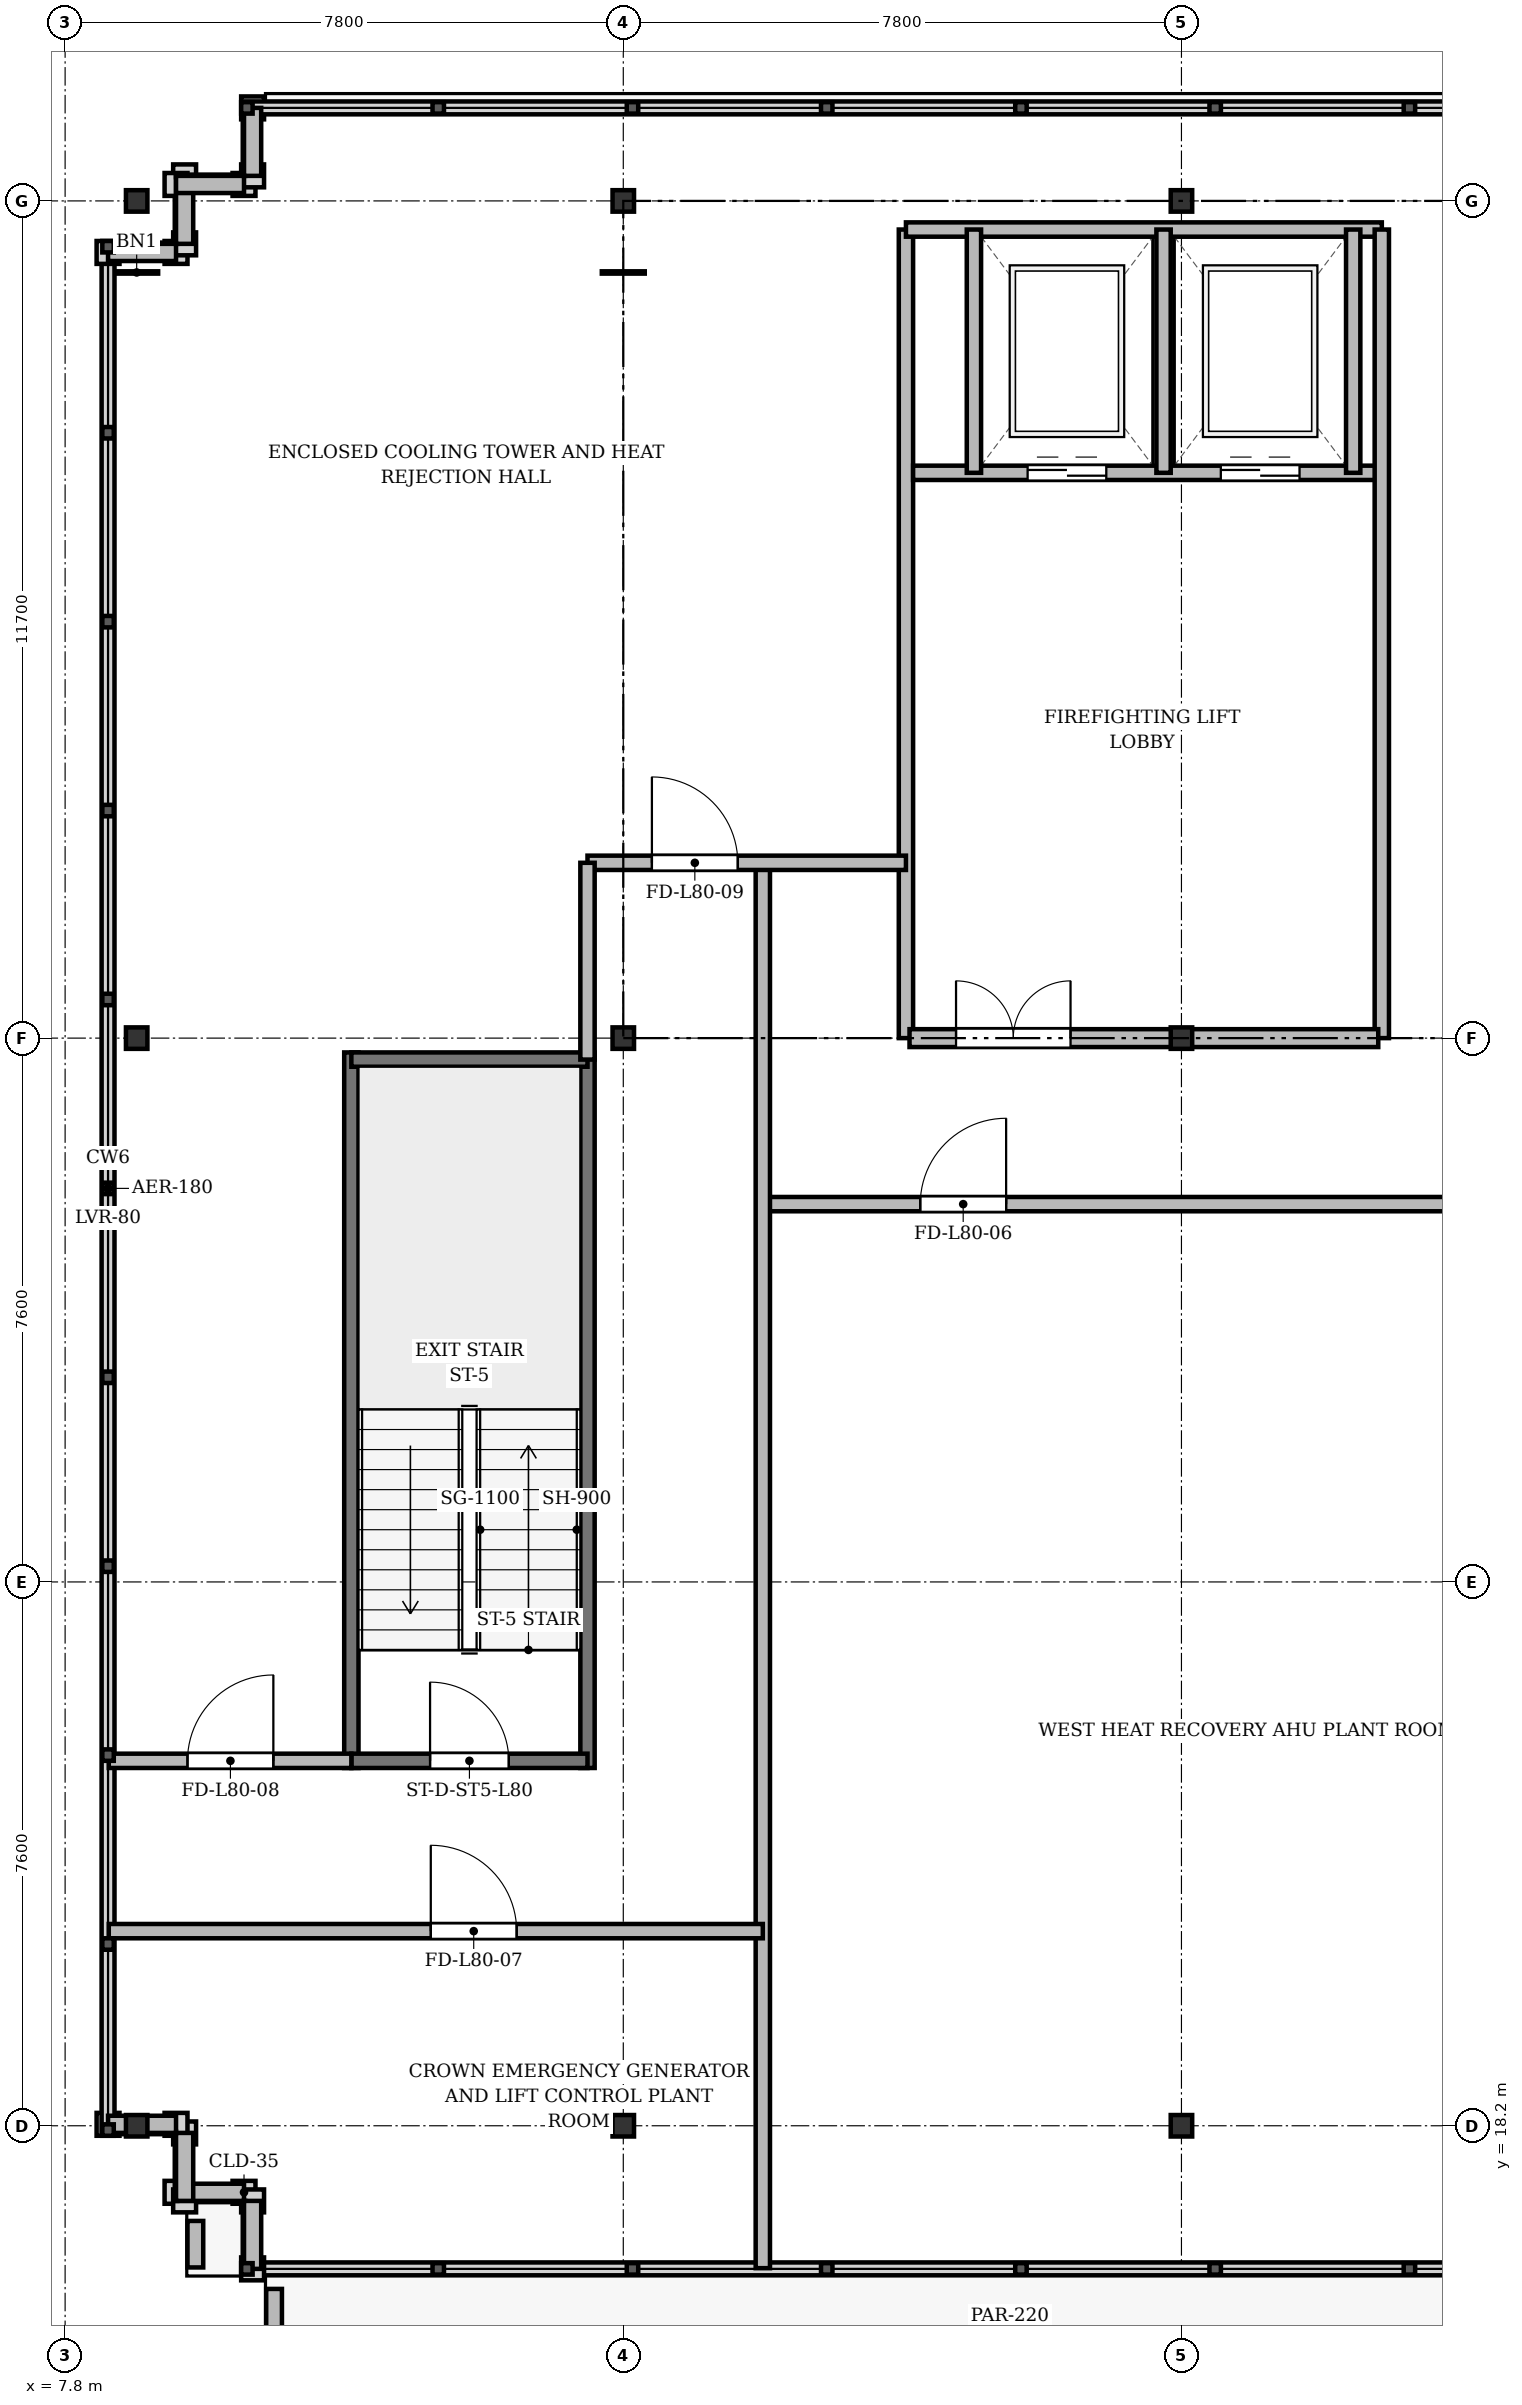
"""IFC4 building model, lengths in metres.
Left out: names, types, materials, properties, quantities, classifications, styles, units other than length and angle.
Written with IfcOpenShell. Run it as: python <this file> out.ifc"""

import sys

from ifc_helpers import new_model, si_unit, direction, frame, frame_2d, origin, origin_2d, place, context, subcontext, project, spatial, rectangle, i_section, extrude, source, transform, mapped, element, fill, save


model = new_model("IFC4")
c1 = context("Model", 3, precision=1e-05, world=origin(), true_north=direction((0.0, 1.0)))
c2 = subcontext(c1, "Body", "Model", "MODEL_VIEW")
j1 = project(units=[si_unit("LENGTHUNIT", "METRE"), si_unit("PLANEANGLEUNIT", "RADIAN")], contexts=[c1])
p1 = place(None, origin())
s1 = spatial("IfcSite", under=j1, at=p1, CompositionType="ELEMENT")
p2 = place(p1, origin())
s2 = spatial("IfcBuilding", under=s1, at=p2, CompositionType="ELEMENT")
p3 = place(p2, frame((0.0, 0.0, 307.9)))
s3 = spatial("IfcBuildingStorey", under=s2, at=p3, CompositionType="ELEMENT", Elevation=307.9)
m1 = source(origin(), c2, "Body", "SweptSolid", [
    extrude(i_section(OverallWidth=0.3, OverallDepth=0.3, WebThickness=0.015, FlangeThickness=0.024, at=origin_2d()), origin(), (0.0, 0.0, 1.0), 4.4),
])
for number, where, z_axis, x_axis in (
    (1, (8.8, 18.2, 0.0), (0.0, 0.0, 1.0), (1.0, 0.0, 0.0)),
    (2, (8.8, 33.4, 0.0), (0.0, 0.0, 1.0), (1.0, 0.0, 0.0)),
    (3, (8.8, 45.1, 0.0), (0.0, 0.0, 1.0), (1.0, 0.0, 0.0)),
    (4, (15.6, 18.2, 0.0), (0.0, 0.0, 1.0), (1.0, 0.0, 0.0)),
    (5, (15.6, 33.4, 0.0), (0.0, 0.0, 1.0), (1.0, 0.0, 0.0)),
    (6, (15.6, 45.1, 0.0), (0.0, 0.0, 1.0), (1.0, 0.0, 0.0)),
    (7, (23.4, 18.2, 0.0), (0.0, 0.0, 1.0), (1.0, 0.0, 0.0)),
    (8, (23.4, 33.4, 0.0), (0.0, 0.0, 1.0), (1.0, 0.0, 0.0)),
    (9, (23.4, 45.1, 0.0), (0.0, 0.0, 1.0), (1.0, 0.0, 0.0)),
):
    element("IfcColumn", number, at=place(p3, frame(where, z_axis=z_axis, x_axis=x_axis)), inside=s3, PredefinedType="COLUMN", context=c2, shape_type="MappedRepresentation", body=[
        mapped(m1, transform((0.0, 0.0, 0.0), x_axis=(1.0, 0.0, 0.0), y_axis=(0.0, 1.0, 0.0), z_axis=(0.0, 0.0, 1.0), scale=1.0)),
    ])
p4 = place(p3, frame((10.3, 17.27, 0.0), z_axis=(0.0, 0.0, 1.0), x_axis=(-1.0, 0.0, 0.0)))
e10 = element("IfcWall", 10, at=p4, inside=s3, PredefinedType="SOLIDWALL", context=c2, shape_type="SweptSolid", body=[
    extrude(rectangle(XDim=0.95, YDim=0.24, at=frame_2d((0.475, 0.0))), origin(), (0.0, 0.0, 1.0), 4.1),
])
p5 = place(p3, frame((9.47, 17.15, 0.0), z_axis=(0.0, 0.0, 1.0), x_axis=(0.0, 1.0, 0.0)))
e11 = element("IfcWall", 11, at=p5, inside=s3, PredefinedType="SOLIDWALL", context=c2, shape_type="SweptSolid", body=[
    extrude(rectangle(XDim=0.95, YDim=0.24, at=frame_2d((0.475, 0.0))), origin(), (0.0, 0.0, 1.0), 4.1),
])
for number, where, z_axis, x_axis in (
    (12, (9.35, 18.22, 0.0), (0.0, 0.0, 1.0), (-1.0, 0.0, 0.0)),
    (13, (8.4, 44.38, 0.0), (0.0, 0.0, 1.0), (1.0, 0.0, 0.0)),
):
    element("IfcWall", number, at=place(p3, frame(where, z_axis=z_axis, x_axis=x_axis)), inside=s3, PredefinedType="SOLIDWALL", context=c2, shape_type="SweptSolid", body=[
        extrude(rectangle(XDim=0.95, YDim=0.24, at=frame_2d((0.475, 0.0))), origin(), (0.0, 0.0, 1.0), 3.6),
    ])
p6 = place(p3, frame((9.47, 44.5, 0.0), z_axis=(0.0, 0.0, 1.0), x_axis=(0.0, 1.0, 0.0)))
e14 = element("IfcWall", 14, at=p6, inside=s3, PredefinedType="SOLIDWALL", context=c2, shape_type="SweptSolid", body=[
    extrude(rectangle(XDim=0.95, YDim=0.24, at=frame_2d((0.475, 0.0))), origin(), (0.0, 0.0, 1.0), 3.6),
])
for number, where, z_axis, x_axis in (
    (15, (9.35, 45.33, 0.0), (0.0, 0.0, 1.0), (1.0, 0.0, 0.0)),
    (16, (10.42, 45.45, 0.0), (0.0, 0.0, 1.0), (0.0, 1.0, 0.0)),
    (17, (10.42, 16.2, 0.0), (0.0, 0.0, 1.0), (0.0, 1.0, 0.0)),
):
    element("IfcWall", number, at=place(p3, frame(where, z_axis=z_axis, x_axis=x_axis)), inside=s3, PredefinedType="SOLIDWALL", context=c2, shape_type="SweptSolid", body=[
        extrude(rectangle(XDim=0.95, YDim=0.24, at=frame_2d((0.475, 0.0))), origin(), (0.0, 0.0, 1.0), 4.1),
    ])
p7 = place(p3, frame((9.62, 16.22, 0.0), z_axis=(0.0, 0.0, 1.0), x_axis=(0.0, 1.0, 0.0)))
e18 = element("IfcWall", 18, at=p7, inside=s3, PredefinedType="PARAPET", context=c2, shape_type="SweptSolid", body=[
    extrude(rectangle(XDim=0.65, YDim=0.22, at=frame_2d((0.325, 0.0))), origin(), (0.0, 0.0, 1.0), 1.08),
])
p8 = place(p3, frame((10.72, 15.12, 0.0), z_axis=(0.0, 0.0, 1.0), x_axis=(0.0, 1.0, 0.0)))
e19 = element("IfcWall", 19, at=p8, inside=s3, PredefinedType="PARAPET", context=c2, shape_type="SweptSolid", body=[
    extrude(rectangle(XDim=0.8, YDim=0.22, at=frame_2d((0.4, 0.0))), origin(), (0.0, 0.0, 1.0), 1.08),
])
for number, where, z_axis, x_axis in (
    (20, (11.8, 23.2, 0.0), (0.0, 0.0, 1.0), (0.0, 1.0, 0.0)),
    (21, (15.1, 23.2, 0.0), (0.0, 0.0, 1.0), (0.0, 1.0, 0.0)),
):
    element("IfcWall", number, at=place(p3, frame(where, z_axis=z_axis, x_axis=x_axis)), inside=s3, PredefinedType="SHEAR", context=c2, shape_type="SweptSolid", body=[
        extrude(rectangle(XDim=10.0, YDim=0.2, at=frame_2d((5.0, 0.0))), origin(), (0.0, 0.0, 1.0), 4.1),
    ])
p9 = place(p3, frame((11.8, 33.1, 0.0), z_axis=(0.0, 0.0, 1.0), x_axis=(1.0, 0.0, 0.0)))
e22 = element("IfcWall", 22, at=p9, inside=s3, PredefinedType="SHEAR", context=c2, shape_type="SweptSolid", body=[
    extrude(rectangle(XDim=3.3, YDim=0.2, at=frame_2d((1.65, 0.0))), origin(), (0.0, 0.0, 1.0), 4.1),
])
p10 = place(p3, frame((11.8, 23.3, 0.0), z_axis=(0.0, 0.0, 1.0), x_axis=(1.0, 0.0, 0.0)))
e23 = element("IfcWall", 23, at=p10, inside=s3, PredefinedType="SHEAR", context=c2, shape_type="SweptSolid", body=[
    extrude(rectangle(XDim=3.3, YDim=0.2, at=frame_2d((1.65, 0.0))), origin(), (0.0, 0.0, 1.0), 4.1),
])
p11 = place(p10, frame((1.1, 0.0, 0.0)))
e24 = element("IfcOpeningElement", 24, at=p11, cuts=e23, PredefinedType="OPENING", context=c2, shape_type="SweptSolid", body=[
    extrude(rectangle(XDim=1.1, YDim=2.15, at=frame_2d((0.55, 1.075))), frame((0.0, 0.11, 0.0), z_axis=(0.0, -1.0, 0.0), x_axis=(1.0, 0.0, 0.0)), (0.0, 0.0, 1.0), 0.22),
])
p12 = place(p3, frame((19.55, 33.4, 0.0), z_axis=(0.0, 0.0, 1.0), x_axis=(0.0, 1.0, 0.0)))
e25 = element("IfcWall", 25, at=p12, inside=s3, PredefinedType="PARTITIONING", context=c2, shape_type="SweptSolid", body=[
    extrude(rectangle(XDim=11.3, YDim=0.2, at=frame_2d((5.65, 0.0))), origin(), (0.0, 0.0, 1.0), 3.6),
])
p13 = place(p3, frame((19.55, 44.7, 0.0), z_axis=(0.0, 0.0, 1.0), x_axis=(1.0, 0.0, 0.0)))
e26 = element("IfcWall", 26, at=p13, inside=s3, PredefinedType="PARTITIONING", context=c2, shape_type="SweptSolid", body=[
    extrude(rectangle(XDim=6.65, YDim=0.2, at=frame_2d((3.325, 0.0))), origin(), (0.0, 0.0, 1.0), 4.1),
])
p14 = place(p3, frame((19.65, 41.3, 0.0), z_axis=(0.0, 0.0, 1.0), x_axis=(1.0, 0.0, 0.0)))
e27 = element("IfcWall", 27, at=p14, inside=s3, PredefinedType="SOLIDWALL", context=c2, shape_type="SweptSolid", body=[
    extrude(rectangle(XDim=6.5, YDim=0.2, at=frame_2d((3.25, 0.0))), origin(), (0.0, 0.0, 1.0), 4.1),
])
p15 = place(p14, frame((1.6, 0.0, 0.0)))
e28 = element("IfcOpeningElement", 28, at=p15, cuts=e27, PredefinedType="OPENING", context=c2, shape_type="SweptSolid", body=[
    extrude(rectangle(XDim=1.1, YDim=2.15, at=frame_2d((0.55, 1.075))), frame((0.0, 0.11, 0.0), z_axis=(0.0, -1.0, 0.0), x_axis=(1.0, 0.0, 0.0)), (0.0, 0.0, 1.0), 0.22),
])
p16 = place(p14, frame((4.3, 0.0, 0.0)))
e29 = element("IfcOpeningElement", 29, at=p16, cuts=e27, PredefinedType="OPENING", context=c2, shape_type="SweptSolid", body=[
    extrude(rectangle(XDim=1.1, YDim=2.15, at=frame_2d((0.55, 1.075))), frame((0.0, 0.11, 0.0), z_axis=(0.0, -1.0, 0.0), x_axis=(1.0, 0.0, 0.0)), (0.0, 0.0, 1.0), 0.22),
])
for number, where, z_axis, x_axis in (
    (30, (20.5, 41.3, 0.0), (0.0, 0.0, 1.0), (0.0, 1.0, 0.0)),
    (31, (23.15, 41.3, 0.0), (0.0, 0.0, 1.0), (0.0, 1.0, 0.0)),
    (32, (25.8, 41.3, 0.0), (0.0, 0.0, 1.0), (0.0, 1.0, 0.0)),
):
    element("IfcWall", number, at=place(p3, frame(where, z_axis=z_axis, x_axis=x_axis)), inside=s3, PredefinedType="SOLIDWALL", context=c2, shape_type="SweptSolid", body=[
        extrude(rectangle(XDim=3.4, YDim=0.2, at=frame_2d((1.7, 0.0))), origin(), (0.0, 0.0, 1.0), 4.1),
    ])
p17 = place(p3, frame((26.2, 33.4, 0.0), z_axis=(0.0, 0.0, 1.0), x_axis=(0.0, 1.0, 0.0)))
e33 = element("IfcWall", 33, at=p17, inside=s3, PredefinedType="SOLIDWALL", context=c2, shape_type="SweptSolid", body=[
    extrude(rectangle(XDim=11.3, YDim=0.2, at=frame_2d((5.65, 0.0))), origin(), (0.0, 0.0, 1.0), 3.6),
])
p18 = place(p3, frame((19.6, 33.4, 0.0), z_axis=(0.0, 0.0, 1.0), x_axis=(1.0, 0.0, 0.0)))
e34 = element("IfcWall", 34, at=p18, inside=s3, PredefinedType="PARTITIONING", context=c2, shape_type="SweptSolid", body=[
    extrude(rectangle(XDim=6.55, YDim=0.25, at=frame_2d((3.275, 0.0))), origin(), (0.0, 0.0, 1.0), 3.6),
])
p19 = place(p18, frame((0.65, 0.0, 0.0)))
e35 = element("IfcOpeningElement", 35, at=p19, cuts=e34, PredefinedType="OPENING", context=c2, shape_type="SweptSolid", body=[
    extrude(rectangle(XDim=1.6, YDim=2.2, at=frame_2d((0.8, 1.1))), frame((0.0, 0.135, 0.0), z_axis=(0.0, -1.0, 0.0), x_axis=(1.0, 0.0, 0.0)), (0.0, 0.0, 1.0), 0.27),
])
p20 = place(p3, frame((17.55, 31.08, 0.0), z_axis=(0.0, 0.0, 1.0), x_axis=(1.0, 0.0, 0.0)))
e36 = element("IfcWall", 36, at=p20, inside=s3, PredefinedType="PARTITIONING", context=c2, shape_type="SweptSolid", body=[
    extrude(rectangle(XDim=13.64, YDim=0.2, at=frame_2d((6.82, 0.0))), origin(), (0.0, 0.0, 1.0), 3.6),
])
p21 = place(p20, frame((2.2, 0.0, 0.0)))
e37 = element("IfcOpeningElement", 37, at=p21, cuts=e36, PredefinedType="OPENING", context=c2, shape_type="SweptSolid", body=[
    extrude(rectangle(XDim=1.2, YDim=2.15, at=frame_2d((0.6, 1.075))), frame((0.0, 0.11, 0.0), z_axis=(0.0, -1.0, 0.0), x_axis=(1.0, 0.0, 0.0)), (0.0, 0.0, 1.0), 0.22),
])
p22 = place(p3, frame((17.55, 16.21, 0.0), z_axis=(0.0, 0.0, 1.0), x_axis=(0.0, 1.0, 0.0)))
e38 = element("IfcWall", 38, at=p22, inside=s3, PredefinedType="PARTITIONING", context=c2, shape_type="SweptSolid", body=[
    extrude(rectangle(XDim=19.64, YDim=0.2, at=frame_2d((9.82, 0.0))), origin(), (0.0, 0.0, 1.0), 3.6),
])
p23 = place(p3, frame((8.41, 20.92, 0.0), z_axis=(0.0, 0.0, 1.0), x_axis=(1.0, 0.0, 0.0)))
e39 = element("IfcWall", 39, at=p23, inside=s3, PredefinedType="PARTITIONING", context=c2, shape_type="SweptSolid", body=[
    extrude(rectangle(XDim=9.14, YDim=0.2, at=frame_2d((4.57, 0.0))), origin(), (0.0, 0.0, 1.0), 3.6),
])
p24 = place(p23, frame((4.5, 0.0, 0.0)))
e40 = element("IfcOpeningElement", 40, at=p24, cuts=e39, PredefinedType="OPENING", context=c2, shape_type="SweptSolid", body=[
    extrude(rectangle(XDim=1.2, YDim=2.15, at=frame_2d((0.6, 1.075))), frame((0.0, 0.11, 0.0), z_axis=(0.0, -1.0, 0.0), x_axis=(1.0, 0.0, 0.0)), (0.0, 0.0, 1.0), 0.22),
])
p25 = place(p3, frame((8.41, 23.3, 0.0), z_axis=(0.0, 0.0, 1.0), x_axis=(1.0, 0.0, 0.0)))
e41 = element("IfcWall", 41, at=p25, inside=s3, PredefinedType="PARTITIONING", context=c2, shape_type="SweptSolid", body=[
    extrude(rectangle(XDim=3.39, YDim=0.2, at=frame_2d((1.695, 0.0))), origin(), (0.0, 0.0, 1.0), 3.6),
])
p26 = place(p25, frame((1.1, 0.0, 0.0)))
e42 = element("IfcOpeningElement", 42, at=p26, cuts=e41, PredefinedType="OPENING", context=c2, shape_type="SweptSolid", body=[
    extrude(rectangle(XDim=1.2, YDim=2.15, at=frame_2d((0.6, 1.075))), frame((0.0, 0.11, 0.0), z_axis=(0.0, -1.0, 0.0), x_axis=(1.0, 0.0, 0.0)), (0.0, 0.0, 1.0), 0.22),
])
p27 = place(p3, frame((15.1, 35.85, 0.0), z_axis=(0.0, 0.0, 1.0), x_axis=(1.0, 0.0, 0.0)))
e43 = element("IfcWall", 43, at=p27, inside=s3, PredefinedType="PARTITIONING", context=c2, shape_type="SweptSolid", body=[
    extrude(rectangle(XDim=4.45, YDim=0.2, at=frame_2d((2.225, 0.0))), origin(), (0.0, 0.0, 1.0), 3.6),
])
p28 = place(p27, frame((0.9, 0.0, 0.0)))
e44 = element("IfcOpeningElement", 44, at=p28, cuts=e43, PredefinedType="OPENING", context=c2, shape_type="SweptSolid", body=[
    extrude(rectangle(XDim=1.2, YDim=2.15, at=frame_2d((0.6, 1.075))), frame((0.0, 0.11, 0.0), z_axis=(0.0, -1.0, 0.0), x_axis=(1.0, 0.0, 0.0)), (0.0, 0.0, 1.0), 0.22),
])
p29 = place(p3, frame((15.1, 33.1, 0.0), z_axis=(0.0, 0.0, 1.0), x_axis=(0.0, 1.0, 0.0)))
e45 = element("IfcWall", 45, at=p29, inside=s3, PredefinedType="PARTITIONING", context=c2, shape_type="SweptSolid", body=[
    extrude(rectangle(XDim=2.75, YDim=0.2, at=frame_2d((1.375, 0.0))), origin(), (0.0, 0.0, 1.0), 3.6),
])
m2 = source(origin(), c2, "Body", "SweptSolid", [
    extrude(rectangle(XDim=1.1, YDim=2.15, at=frame_2d((0.55, 1.075))), frame((0.0, 0.025, 0.0), z_axis=(0.0, -1.0, 0.0), x_axis=(1.0, 0.0, 0.0)), (0.0, 0.0, 1.0), 0.05),
])
p30 = place(p11, origin())
e46 = element("IfcDoor", 46, at=p30, inside=s3, OperationType="SINGLE_SWING_LEFT", PredefinedType="DOOR", context=c2, shape_type="MappedRepresentation", body=[
    mapped(m2, transform((0.0, 0.0, 0.0), x_axis=(1.0, 0.0, 0.0), y_axis=(0.0, 1.0, 0.0), z_axis=(0.0, 0.0, 1.0), scale=1.0)),
])
fill(e24, e46)
p31 = place(p15, origin())
e47 = element("IfcDoor", 47, at=p31, inside=s3, OperationType="DOUBLE_DOOR_SLIDING", PredefinedType="DOOR", context=c2, shape_type="MappedRepresentation", body=[
    mapped(m2, transform((0.0, 0.0, 0.0), x_axis=(1.0, 0.0, 0.0), y_axis=(0.0, 1.0, 0.0), z_axis=(0.0, 0.0, 1.0), scale=1.0)),
])
fill(e28, e47)
p32 = place(p16, origin())
e48 = element("IfcDoor", 48, at=p32, inside=s3, OperationType="DOUBLE_DOOR_SLIDING", PredefinedType="DOOR", context=c2, shape_type="MappedRepresentation", body=[
    mapped(m2, transform((0.0, 0.0, 0.0), x_axis=(1.0, 0.0, 0.0), y_axis=(0.0, 1.0, 0.0), z_axis=(0.0, 0.0, 1.0), scale=1.0)),
])
fill(e29, e48)
m3 = source(origin(), c2, "Body", "SweptSolid", [
    extrude(rectangle(XDim=1.6, YDim=2.2, at=frame_2d((0.8, 1.1))), frame((0.0, 0.025, 0.0), z_axis=(0.0, -1.0, 0.0), x_axis=(1.0, 0.0, 0.0)), (0.0, 0.0, 1.0), 0.05),
])
p33 = place(p19, origin())
e49 = element("IfcDoor", 49, at=p33, inside=s3, OperationType="DOUBLE_DOOR_SINGLE_SWING", PredefinedType="DOOR", context=c2, shape_type="MappedRepresentation", body=[
    mapped(m3, transform((0.0, 0.0, 0.0), x_axis=(1.0, 0.0, 0.0), y_axis=(0.0, 1.0, 0.0), z_axis=(0.0, 0.0, 1.0), scale=1.0)),
])
fill(e35, e49)
m4 = source(origin(), c2, "Body", "SweptSolid", [
    extrude(rectangle(XDim=1.2, YDim=2.15, at=frame_2d((0.6, 1.075))), frame((0.0, 0.025, 0.0), z_axis=(0.0, -1.0, 0.0), x_axis=(1.0, 0.0, 0.0)), (0.0, 0.0, 1.0), 0.05),
])
p34 = place(p21, origin())
e50 = element("IfcDoor", 50, at=p34, inside=s3, OperationType="SINGLE_SWING_RIGHT", PredefinedType="DOOR", context=c2, shape_type="MappedRepresentation", body=[
    mapped(m4, transform((0.0, 0.0, 0.0), x_axis=(1.0, 0.0, 0.0), y_axis=(0.0, 1.0, 0.0), z_axis=(0.0, 0.0, 1.0), scale=1.0)),
])
fill(e37, e50)
p35 = place(p24, origin())
e51 = element("IfcDoor", 51, at=p35, inside=s3, OperationType="SINGLE_SWING_LEFT", PredefinedType="DOOR", context=c2, shape_type="MappedRepresentation", body=[
    mapped(m4, transform((0.0, 0.0, 0.0), x_axis=(1.0, 0.0, 0.0), y_axis=(0.0, 1.0, 0.0), z_axis=(0.0, 0.0, 1.0), scale=1.0)),
])
fill(e40, e51)
p36 = place(p26, origin())
e52 = element("IfcDoor", 52, at=p36, inside=s3, OperationType="SINGLE_SWING_RIGHT", PredefinedType="DOOR", context=c2, shape_type="MappedRepresentation", body=[
    mapped(m4, transform((0.0, 0.0, 0.0), x_axis=(1.0, 0.0, 0.0), y_axis=(0.0, 1.0, 0.0), z_axis=(0.0, 0.0, 1.0), scale=1.0)),
])
fill(e42, e52)
p37 = place(p28, origin())
e53 = element("IfcDoor", 53, at=p37, inside=s3, OperationType="SINGLE_SWING_LEFT", PredefinedType="DOOR", context=c2, shape_type="MappedRepresentation", body=[
    mapped(m4, transform((0.0, 0.0, 0.0), x_axis=(1.0, 0.0, 0.0), y_axis=(0.0, 1.0, 0.0), z_axis=(0.0, 0.0, 1.0), scale=1.0)),
])
fill(e44, e53)
save(model, sys.argv[1])
